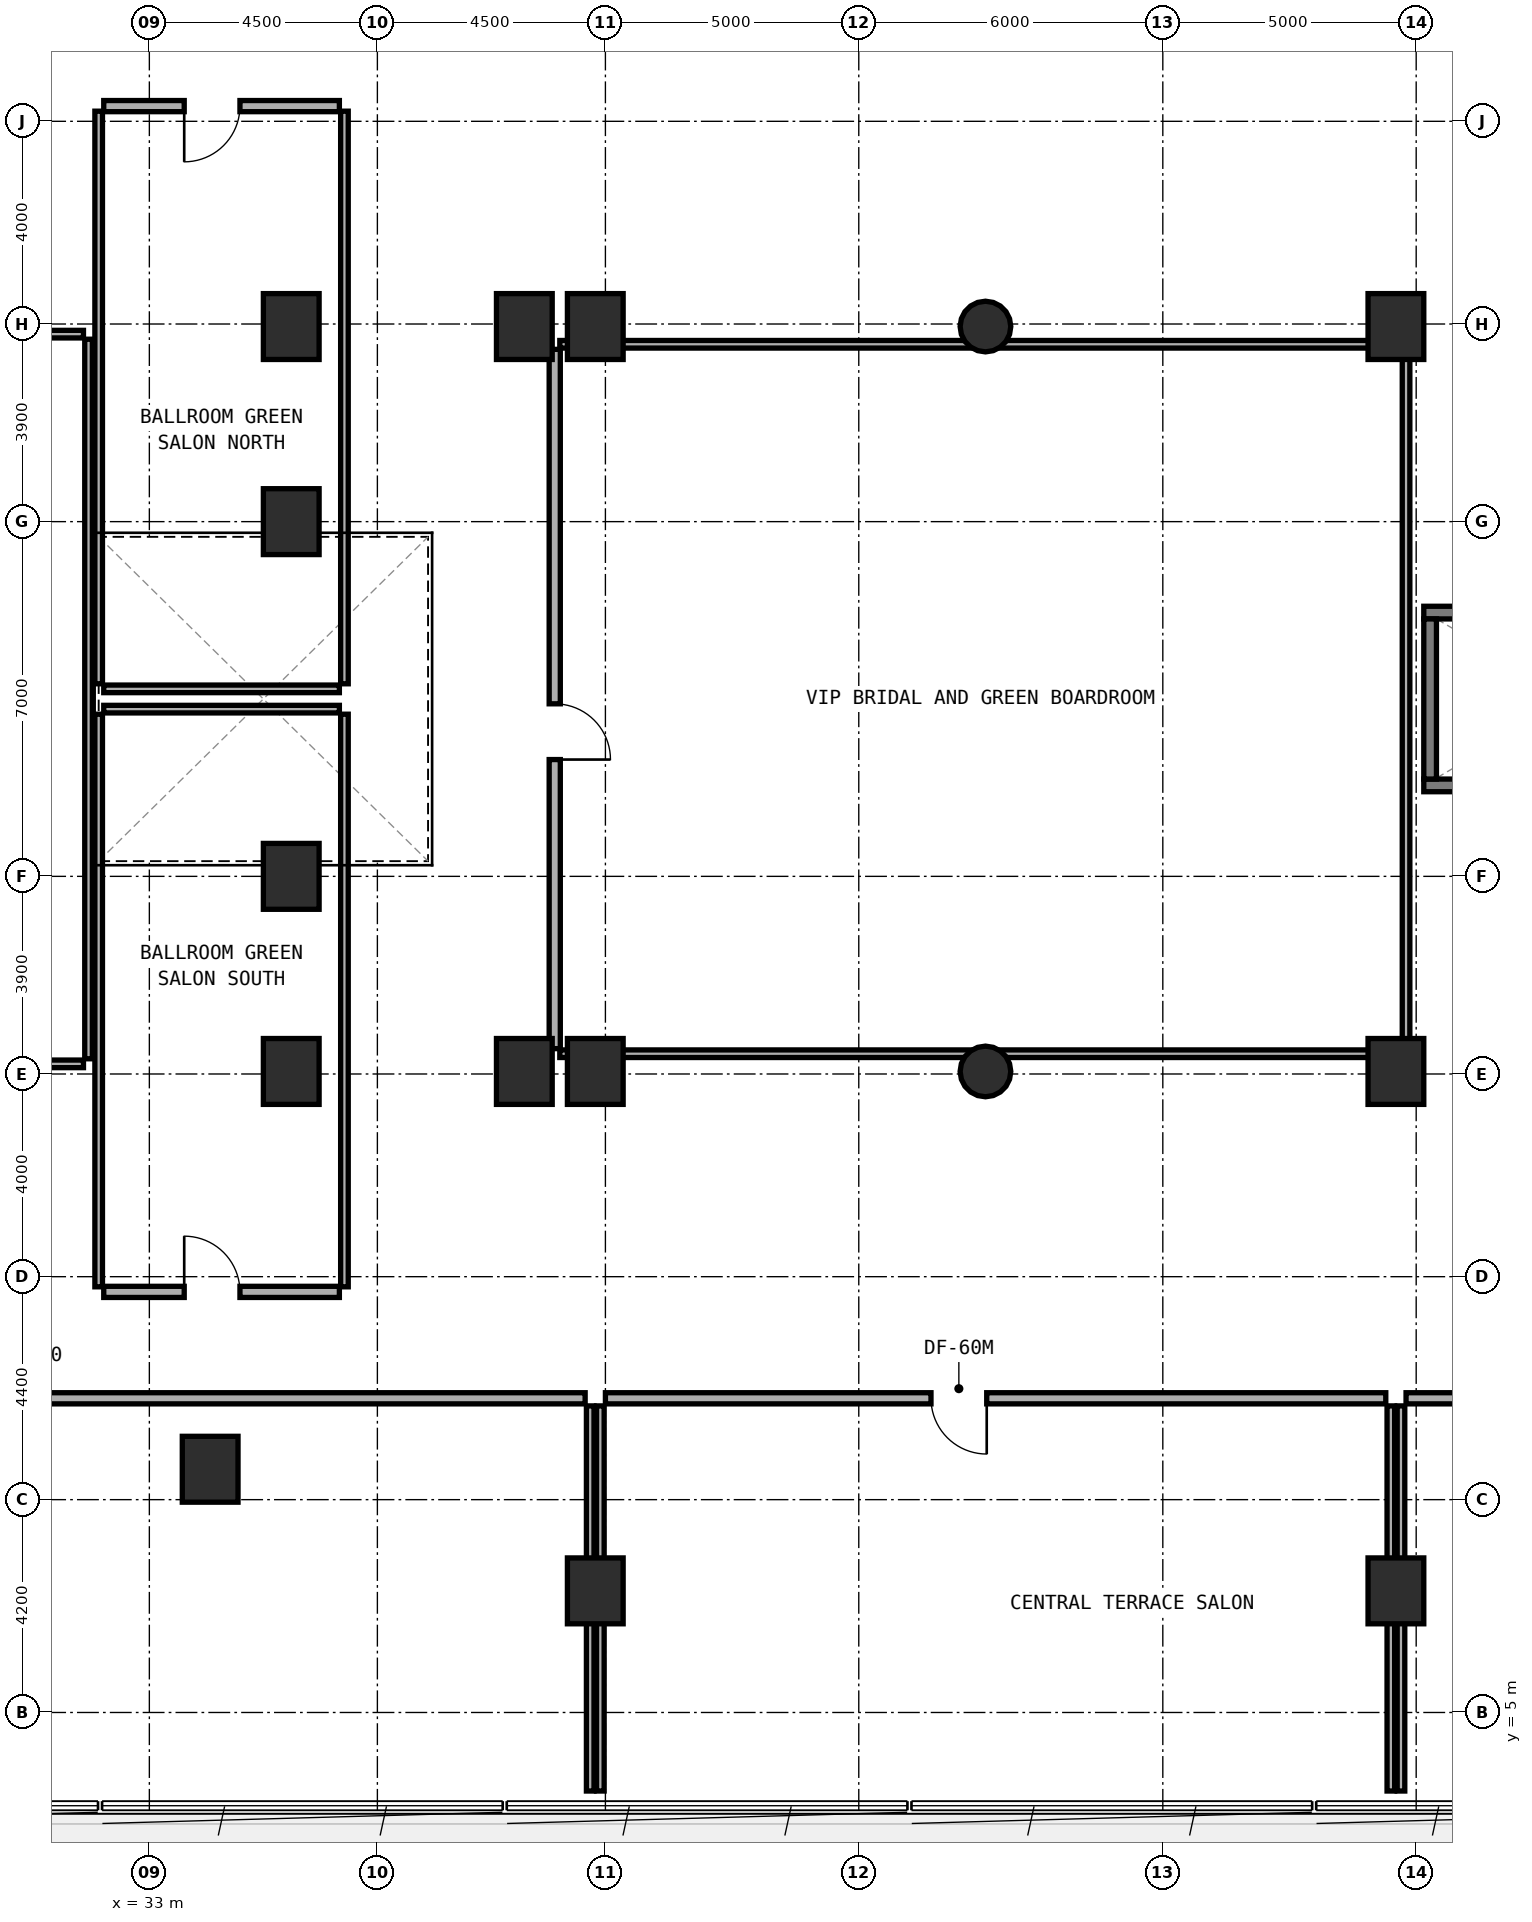
"""IFC4 building model, lengths in metres.
Left out: names, types, materials, properties, quantities, classifications, styles, units other than length and angle.
Written with IfcOpenShell. Run it as: python <this file> out.ifc"""

import sys

from ifc_helpers import new_model, si_unit, direction, frame, frame_2d, origin, origin_2d, place, context, subcontext, project, spatial, rectangle, circle, extrude, element, fill, save


model = new_model("IFC4")
c1 = context("Model", 3, precision=1e-05, world=origin(), true_north=direction((0.0, 1.0)))
c2 = subcontext(c1, "Body", "Model", "MODEL_VIEW")
j1 = project(units=[si_unit("LENGTHUNIT", "METRE"), si_unit("PLANEANGLEUNIT", "RADIAN")], contexts=[c1])
p1 = place(None, origin())
s1 = spatial("IfcSite", under=j1, at=p1, CompositionType="ELEMENT")
p2 = place(p1, origin())
s2 = spatial("IfcBuilding", under=s1, at=p2, CompositionType="ELEMENT")
p3 = place(p2, frame((0.0, 0.0, 10.2)))
s3 = spatial("IfcBuildingStorey", under=s2, at=p3, CompositionType="ELEMENT", Elevation=10.2)
for number, where, z_axis, x_axis in (
    (1, (58.15, 23.295, 0.0), (0.0, 0.0, 1.0), (1.0, 0.0, 0.0)),
    (2, (58.15, 26.705, 0.0), (0.0, 0.0, 1.0), (1.0, 0.0, 0.0)),
):
    element("IfcWall", number, at=place(p3, frame(where, z_axis=z_axis, x_axis=x_axis)), inside=s3, PredefinedType="STANDARD", context=c2, shape_type="SweptSolid", body=[
        extrude(rectangle(XDim=7.5, YDim=0.25, at=frame_2d((3.75, 0.0))), origin(), (0.0, 0.0, 1.0), 4.8),
    ])
p4 = place(p3, frame((58.275, 23.42, 0.0), z_axis=(0.0, 0.0, 1.0), x_axis=(0.0, 1.0, 0.0)))
e3 = element("IfcWall", 3, at=p4, inside=s3, PredefinedType="STANDARD", context=c2, shape_type="SweptSolid", body=[
    extrude(rectangle(XDim=3.16, YDim=0.25, at=frame_2d((1.58, 0.0))), origin(), (0.0, 0.0, 1.0), 4.8),
])
for number, where, z_axis, x_axis in (
    (4, (34.2, 9.8, 0.0), (0.0, 0.0, 1.0), (1.0, 0.0, 0.0)),
    (5, (35.8, 21.5, 0.0), (0.0, 0.0, 1.0), (1.0, 0.0, 0.0)),
    (6, (35.8, 28.5, 0.0), (0.0, 0.0, 1.0), (1.0, 0.0, 0.0)),
    (7, (35.8, 17.65, 0.0), (0.0, 0.0, 1.0), (1.0, 0.0, 0.0)),
    (8, (35.8, 32.35, 0.0), (0.0, 0.0, 1.0), (1.0, 0.0, 0.0)),
    (9, (40.4, 17.65, 0.0), (0.0, 0.0, 1.0), (1.0, 0.0, 0.0)),
    (10, (40.4, 32.35, 0.0), (0.0, 0.0, 1.0), (1.0, 0.0, 0.0)),
    (11, (41.8, 17.65, 0.0), (0.0, 0.0, 1.0), (1.0, 0.0, 0.0)),
    (12, (41.8, 32.35, 0.0), (0.0, 0.0, 1.0), (1.0, 0.0, 0.0)),
):
    element("IfcColumn", number, at=place(p3, frame(where, z_axis=z_axis, x_axis=x_axis)), inside=s3, PredefinedType="COLUMN", context=c2, shape_type="SweptSolid", body=[
        extrude(rectangle(XDim=1.1, YDim=1.3, at=origin_2d()), origin(), (0.0, 0.0, 1.0), 4.8),
    ])
for number, where, z_axis, x_axis in (
    (13, (49.5, 17.65, 0.0), (0.0, 0.0, 1.0), (1.0, 0.0, 0.0)),
    (14, (49.5, 32.35, 0.0), (0.0, 0.0, 1.0), (1.0, 0.0, 0.0)),
):
    element("IfcColumn", number, at=place(p3, frame(where, z_axis=z_axis, x_axis=x_axis)), inside=s3, PredefinedType="COLUMN", context=c2, shape_type="SweptSolid", body=[
        extrude(circle(Radius=0.5, at=origin_2d()), origin(), (0.0, 0.0, 1.0), 4.8),
    ])
for number, where, z_axis, x_axis in (
    (15, (57.6, 17.65, 0.0), (0.0, 0.0, 1.0), (1.0, 0.0, 0.0)),
    (16, (57.6, 32.35, 0.0), (0.0, 0.0, 1.0), (1.0, 0.0, 0.0)),
    (17, (41.8, 7.4, 0.0), (0.0, 0.0, 1.0), (1.0, 0.0, 0.0)),
    (18, (57.6, 7.4, 0.0), (0.0, 0.0, 1.0), (1.0, 0.0, 0.0)),
):
    element("IfcColumn", number, at=place(p3, frame(where, z_axis=z_axis, x_axis=x_axis)), inside=s3, PredefinedType="COLUMN", context=c2, shape_type="SweptSolid", body=[
        extrude(rectangle(XDim=1.1, YDim=1.3, at=origin_2d()), origin(), (0.0, 0.0, 1.0), 4.8),
    ])
p5 = place(p3, frame((31.8, 17.9, 0.0), z_axis=(0.0, 0.0, 1.0), x_axis=(0.0, 1.0, 0.0)))
e19 = element("IfcWall", 19, at=p5, inside=s3, PredefinedType="PARTITIONING", context=c2, shape_type="SweptSolid", body=[
    extrude(rectangle(XDim=14.2, YDim=0.15, at=frame_2d((7.1, 0.0))), origin(), (0.0, 0.0, 1.0), 3.425),
])
for number, where, z_axis, x_axis in (
    (20, (11.9, 17.8, 0.0), (0.0, 0.0, 1.0), (1.0, 0.0, 0.0)),
    (21, (11.9, 32.2, 0.0), (0.0, 0.0, 1.0), (1.0, 0.0, 0.0)),
):
    element("IfcWall", number, at=place(p3, frame(where, z_axis=z_axis, x_axis=x_axis)), inside=s3, PredefinedType="PARTITIONING", context=c2, shape_type="SweptSolid", body=[
        extrude(rectangle(XDim=19.8, YDim=0.15, at=frame_2d((9.9, 0.0))), origin(), (0.0, 0.0, 1.0), 3.525),
    ])
p6 = place(p3, frame((41.7, 3.45, 0.0), z_axis=(0.0, 0.0, 1.0), x_axis=(0.0, 1.0, 0.0)))
e22 = element("IfcWall", 22, at=p6, inside=s3, PredefinedType="PARTITIONING", context=c2, shape_type="SweptSolid", body=[
    extrude(rectangle(XDim=7.6, YDim=0.15, at=frame_2d((3.8, 0.0))), origin(), (0.0, 0.0, 1.0), 3.725),
])
p7 = place(p3, frame((0.45, 11.2, 0.0), z_axis=(0.0, 0.0, 1.0), x_axis=(1.0, 0.0, 0.0)))
e23 = element("IfcWall", 23, at=p7, inside=s3, PredefinedType="SOLIDWALL", context=c2, shape_type="SweptSolid", body=[
    extrude(rectangle(XDim=41.15, YDim=0.22, at=frame_2d((20.575, 0.0))), origin(), (0.0, 0.0, 1.0), 3.525),
])
p8 = place(p7, frame((18.013, 0.0, 0.0)))
e24 = element("IfcOpeningElement", 24, at=p8, cuts=e23, PredefinedType="OPENING", context=c2, shape_type="SweptSolid", body=[
    extrude(rectangle(XDim=1.1, YDim=2.1, at=frame_2d((0.55, 1.05))), frame((0.0, 0.12, 0.0), z_axis=(0.0, -1.0, 0.0), x_axis=(1.0, 0.0, 0.0)), (0.0, 0.0, 1.0), 0.24),
])
for number, where, z_axis, x_axis in (
    (25, (41.9, 3.45, 0.0), (0.0, 0.0, 1.0), (0.0, 1.0, 0.0)),
    (26, (57.5, 3.45, 0.0), (0.0, 0.0, 1.0), (0.0, 1.0, 0.0)),
):
    element("IfcWall", number, at=place(p3, frame(where, z_axis=z_axis, x_axis=x_axis)), inside=s3, PredefinedType="PARTITIONING", context=c2, shape_type="SweptSolid", body=[
        extrude(rectangle(XDim=7.6, YDim=0.15, at=frame_2d((3.8, 0.0))), origin(), (0.0, 0.0, 1.0), 3.625),
    ])
p9 = place(p3, frame((42.0, 11.2, 0.0), z_axis=(0.0, 0.0, 1.0), x_axis=(1.0, 0.0, 0.0)))
e27 = element("IfcWall", 27, at=p9, inside=s3, PredefinedType="SOLIDWALL", context=c2, shape_type="SweptSolid", body=[
    extrude(rectangle(XDim=15.4, YDim=0.22, at=frame_2d((7.7, 0.0))), origin(), (0.0, 0.0, 1.0), 4.45),
])
p10 = place(p9, frame((6.425, 0.0, 0.0)))
e28 = element("IfcOpeningElement", 28, at=p10, cuts=e27, PredefinedType="OPENING", context=c2, shape_type="SweptSolid", body=[
    extrude(rectangle(XDim=1.1, YDim=2.1, at=frame_2d((0.55, 1.05))), frame((0.0, 0.12, 0.0), z_axis=(0.0, -1.0, 0.0), x_axis=(1.0, 0.0, 0.0)), (0.0, 0.0, 1.0), 0.24),
])
p11 = place(p3, frame((57.7, 3.45, 0.0), z_axis=(0.0, 0.0, 1.0), x_axis=(0.0, 1.0, 0.0)))
e29 = element("IfcWall", 29, at=p11, inside=s3, PredefinedType="PARTITIONING", context=c2, shape_type="SweptSolid", body=[
    extrude(rectangle(XDim=7.6, YDim=0.15, at=frame_2d((3.8, 0.0))), origin(), (0.0, 0.0, 1.0), 3.725),
])
p12 = place(p3, frame((57.8, 11.2, 0.0), z_axis=(0.0, 0.0, 1.0), x_axis=(1.0, 0.0, 0.0)))
e30 = element("IfcWall", 30, at=p12, inside=s3, PredefinedType="SOLIDWALL", context=c2, shape_type="SweptSolid", body=[
    extrude(rectangle(XDim=37.75, YDim=0.22, at=frame_2d((18.875, 0.0))), origin(), (0.0, 0.0, 1.0), 3.925),
])
p13 = place(p12, frame((16.482, 0.0, 0.0)))
e31 = element("IfcOpeningElement", 31, at=p13, cuts=e30, PredefinedType="OPENING", context=c2, shape_type="SweptSolid", body=[
    extrude(rectangle(XDim=1.1, YDim=2.1, at=frame_2d((0.55, 1.05))), frame((0.0, 0.12, 0.0), z_axis=(0.0, -1.0, 0.0), x_axis=(1.0, 0.0, 0.0)), (0.0, 0.0, 1.0), 0.24),
])
p14 = place(p3, frame((57.8, 18.1, 0.0), z_axis=(0.0, 0.0, 1.0), x_axis=(0.0, 1.0, 0.0)))
e32 = element("IfcWall", 32, at=p14, inside=s3, PredefinedType="PARTITIONING", context=c2, shape_type="SweptSolid", body=[
    extrude(rectangle(XDim=13.8, YDim=0.15, at=frame_2d((6.9, 0.0))), origin(), (0.0, 0.0, 1.0), 3.725),
])
for number, where, z_axis, x_axis in (
    (33, (41.1, 18.0, 0.0), (0.0, 0.0, 1.0), (1.0, 0.0, 0.0)),
    (34, (41.1, 32.0, 0.0), (0.0, 0.0, 1.0), (1.0, 0.0, 0.0)),
):
    element("IfcWall", number, at=place(p3, frame(where, z_axis=z_axis, x_axis=x_axis)), inside=s3, PredefinedType="PARTITIONING", context=c2, shape_type="SweptSolid", body=[
        extrude(rectangle(XDim=16.6, YDim=0.15, at=frame_2d((8.3, 0.0))), origin(), (0.0, 0.0, 1.0), 3.725),
    ])
p15 = place(p3, frame((41.0, 18.1, 0.0), z_axis=(0.0, 0.0, 1.0), x_axis=(0.0, 1.0, 0.0)))
e35 = element("IfcWall", 35, at=p15, inside=s3, PredefinedType="SOLIDWALL", context=c2, shape_type="SweptSolid", body=[
    extrude(rectangle(XDim=13.8, YDim=0.22, at=frame_2d((6.9, 0.0))), origin(), (0.0, 0.0, 1.0), 4.45),
])
p16 = place(p15, frame((5.705, 0.0, 0.0)))
e36 = element("IfcOpeningElement", 36, at=p16, cuts=e35, PredefinedType="OPENING", context=c2, shape_type="SweptSolid", body=[
    extrude(rectangle(XDim=1.1, YDim=2.1, at=frame_2d((0.55, 1.05))), frame((0.0, 0.12, 0.0), z_axis=(0.0, -1.0, 0.0), x_axis=(1.0, 0.0, 0.0)), (0.0, 0.0, 1.0), 0.24),
])
p17 = place(p3, frame((32.0, 13.4, 0.0), z_axis=(0.0, 0.0, 1.0), x_axis=(0.0, 1.0, 0.0)))
e37 = element("IfcWall", 37, at=p17, inside=s3, PredefinedType="PARTITIONING", context=c2, shape_type="SweptSolid", body=[
    extrude(rectangle(XDim=11.3, YDim=0.15, at=frame_2d((5.65, 0.0))), origin(), (0.0, 0.0, 1.0), 3.425),
])
p18 = place(p3, frame((36.85, 13.4, 0.0), z_axis=(0.0, 0.0, 1.0), x_axis=(0.0, 1.0, 0.0)))
e38 = element("IfcWall", 38, at=p18, inside=s3, PredefinedType="PARTITIONING", context=c2, shape_type="SweptSolid", body=[
    extrude(rectangle(XDim=11.3, YDim=0.15, at=frame_2d((5.65, 0.0))), origin(), (0.0, 0.0, 1.0), 3.525),
])
p19 = place(p3, frame((32.1, 24.8, 0.0), z_axis=(0.0, 0.0, 1.0), x_axis=(1.0, 0.0, 0.0)))
e39 = element("IfcWall", 39, at=p19, inside=s3, PredefinedType="PARTITIONING", context=c2, shape_type="SweptSolid", body=[
    extrude(rectangle(XDim=4.65, YDim=0.15, at=frame_2d((2.325, 0.0))), origin(), (0.0, 0.0, 1.0), 3.975),
])
p20 = place(p3, frame((32.1, 13.3, 0.0), z_axis=(0.0, 0.0, 1.0), x_axis=(1.0, 0.0, 0.0)))
e40 = element("IfcWall", 40, at=p20, inside=s3, PredefinedType="SOLIDWALL", context=c2, shape_type="SweptSolid", body=[
    extrude(rectangle(XDim=4.65, YDim=0.22, at=frame_2d((2.325, 0.0))), origin(), (0.0, 0.0, 1.0), 3.975),
])
p21 = place(p20, frame((1.588, 0.0, 0.0)))
e41 = element("IfcOpeningElement", 41, at=p21, cuts=e40, PredefinedType="OPENING", context=c2, shape_type="SweptSolid", body=[
    extrude(rectangle(XDim=1.1, YDim=2.1, at=frame_2d((0.55, 1.05))), frame((0.0, 0.12, 0.0), z_axis=(0.0, -1.0, 0.0), x_axis=(1.0, 0.0, 0.0)), (0.0, 0.0, 1.0), 0.24),
])
for number, where, z_axis, x_axis in (
    (42, (32.0, 25.3, 0.0), (0.0, 0.0, 1.0), (0.0, 1.0, 0.0)),
    (43, (36.85, 25.3, 0.0), (0.0, 0.0, 1.0), (0.0, 1.0, 0.0)),
):
    element("IfcWall", number, at=place(p3, frame(where, z_axis=z_axis, x_axis=x_axis)), inside=s3, PredefinedType="PARTITIONING", context=c2, shape_type="SweptSolid", body=[
        extrude(rectangle(XDim=11.3, YDim=0.15, at=frame_2d((5.65, 0.0))), origin(), (0.0, 0.0, 1.0), 3.525),
    ])
p22 = place(p3, frame((32.1, 25.2, 0.0), z_axis=(0.0, 0.0, 1.0), x_axis=(1.0, 0.0, 0.0)))
e44 = element("IfcWall", 44, at=p22, inside=s3, PredefinedType="PARTITIONING", context=c2, shape_type="SweptSolid", body=[
    extrude(rectangle(XDim=4.65, YDim=0.15, at=frame_2d((2.325, 0.0))), origin(), (0.0, 0.0, 1.0), 3.975),
])
p23 = place(p3, frame((32.1, 36.7, 0.0), z_axis=(0.0, 0.0, 1.0), x_axis=(1.0, 0.0, 0.0)))
e45 = element("IfcWall", 45, at=p23, inside=s3, PredefinedType="SOLIDWALL", context=c2, shape_type="SweptSolid", body=[
    extrude(rectangle(XDim=4.65, YDim=0.22, at=frame_2d((2.325, 0.0))), origin(), (0.0, 0.0, 1.0), 3.975),
])
p24 = place(p23, frame((1.588, 0.0, 0.0)))
e46 = element("IfcOpeningElement", 46, at=p24, cuts=e45, PredefinedType="OPENING", context=c2, shape_type="SweptSolid", body=[
    extrude(rectangle(XDim=1.1, YDim=2.1, at=frame_2d((0.55, 1.05))), frame((0.0, 0.12, 0.0), z_axis=(0.0, -1.0, 0.0), x_axis=(1.0, 0.0, 0.0)), (0.0, 0.0, 1.0), 0.24),
])
p25 = place(p10, frame((1.1, 0.0, 0.0), z_axis=(0.0, 0.0, 1.0), x_axis=(-1.0, 0.0, 0.0)))
e47 = element("IfcDoor", 47, at=p25, inside=s3, OperationType="SINGLE_SWING_LEFT", PredefinedType="DOOR", context=c2, shape_type="SweptSolid", body=[
    extrude(rectangle(XDim=1.1, YDim=2.1, at=frame_2d((0.55, 1.05))), frame((0.0, 0.025, 0.0), z_axis=(0.0, -1.0, 0.0), x_axis=(1.0, 0.0, 0.0)), (0.0, 0.0, 1.0), 0.05),
])
fill(e28, e47)
p26 = place(p16, frame((1.1, 0.0, 0.0), z_axis=(0.0, 0.0, 1.0), x_axis=(-1.0, 0.0, 0.0)))
e48 = element("IfcDoor", 48, at=p26, inside=s3, OperationType="SINGLE_SWING_RIGHT", PredefinedType="DOOR", context=c2, shape_type="SweptSolid", body=[
    extrude(rectangle(XDim=1.1, YDim=2.1, at=frame_2d((0.55, 1.05))), frame((0.0, 0.025, 0.0), z_axis=(0.0, -1.0, 0.0), x_axis=(1.0, 0.0, 0.0)), (0.0, 0.0, 1.0), 0.05),
])
fill(e36, e48)
p27 = place(p21, origin())
e49 = element("IfcDoor", 49, at=p27, inside=s3, OperationType="SINGLE_SWING_LEFT", PredefinedType="DOOR", context=c2, shape_type="SweptSolid", body=[
    extrude(rectangle(XDim=1.1, YDim=2.1, at=frame_2d((0.55, 1.05))), frame((0.0, 0.025, 0.0), z_axis=(0.0, -1.0, 0.0), x_axis=(1.0, 0.0, 0.0)), (0.0, 0.0, 1.0), 0.05),
])
fill(e41, e49)
p28 = place(p24, frame((1.1, 0.0, 0.0), z_axis=(0.0, 0.0, 1.0), x_axis=(-1.0, 0.0, 0.0)))
e50 = element("IfcDoor", 50, at=p28, inside=s3, OperationType="SINGLE_SWING_RIGHT", PredefinedType="DOOR", context=c2, shape_type="SweptSolid", body=[
    extrude(rectangle(XDim=1.1, YDim=2.1, at=frame_2d((0.55, 1.05))), frame((0.0, 0.025, 0.0), z_axis=(0.0, -1.0, 0.0), x_axis=(1.0, 0.0, 0.0)), (0.0, 0.0, 1.0), 0.05),
])
fill(e46, e50)
save(model, sys.argv[1])
